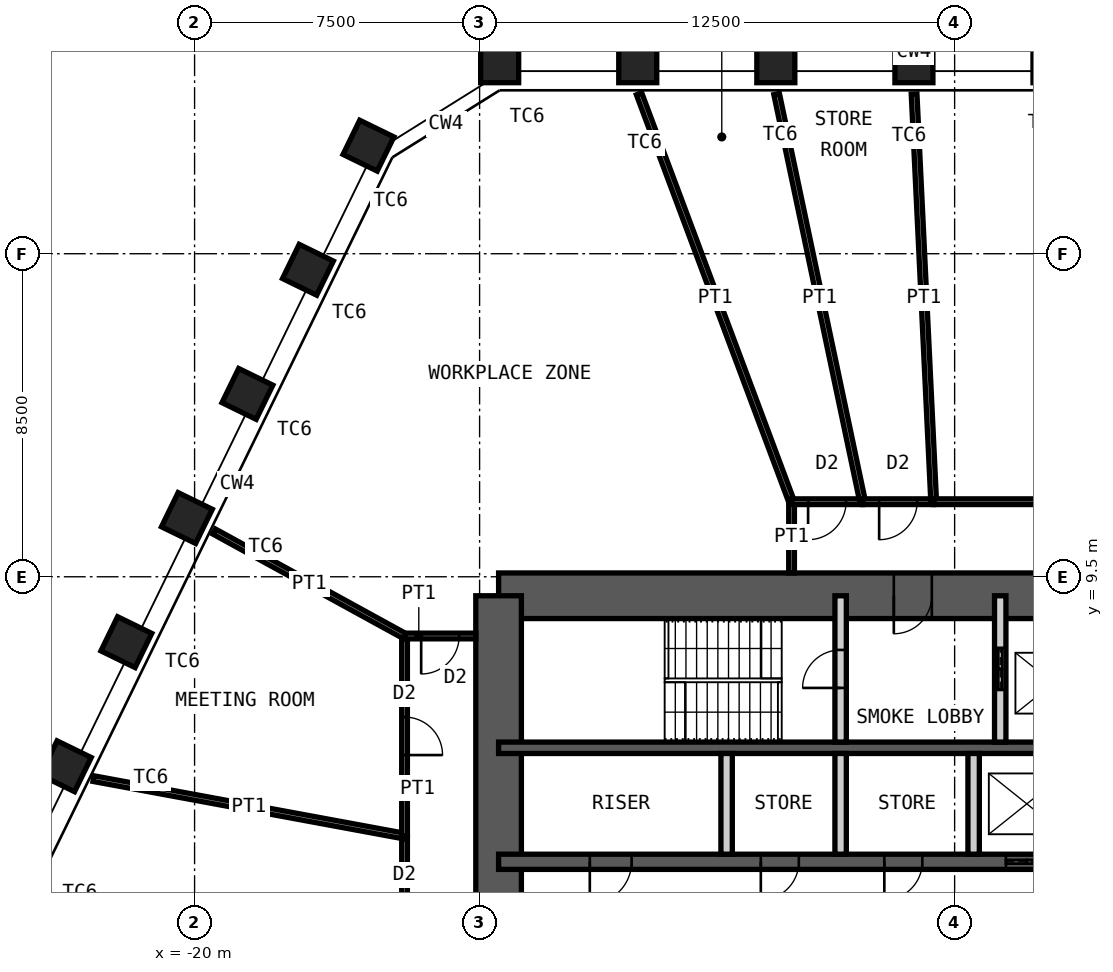
"""IFC4 building model, lengths in metres.
Left out: names, types, materials, properties, quantities, classifications, styles, units other than length and angle.
Written with IfcOpenShell. Run it as: python <this file> out.ifc"""

import sys

from ifc_helpers import new_model, si_unit, direction, frame, frame_2d, origin, origin_2d, place, context, subcontext, project, spatial, rectangle, hollow_rectangle, extrude, element, fill, save


model = new_model("IFC4")
c1 = context("Model", 3, precision=1e-05, world=origin(), true_north=direction((0.0, 1.0)))
c2 = subcontext(c1, "Body", "Model", "MODEL_VIEW")
j1 = project(units=[si_unit("LENGTHUNIT", "METRE"), si_unit("PLANEANGLEUNIT", "RADIAN")], contexts=[c1])
p1 = place(None, origin())
s1 = spatial("IfcSite", under=j1, at=p1, CompositionType="ELEMENT")
p2 = place(p1, origin())
s2 = spatial("IfcBuilding", under=s1, at=p2, CompositionType="ELEMENT")
p3 = place(p2, frame((0.0, 0.0, 239.2)))
s3 = spatial("IfcBuildingStorey", under=s2, at=p3, CompositionType="ELEMENT", Elevation=239.2)
for number, where, z_axis, x_axis in (
    (1, (-11.972, 23.0, 0.0), (0.0, 0.0, 1.0), (-1.0, 0.0, 0.0)),
    (2, (-8.338, 23.0, 0.0), (0.0, 0.0, 1.0), (-1.0, 0.0, 0.0)),
    (3, (-4.705, 23.0, 0.0), (0.0, 0.0, 1.0), (-1.0, 0.0, 0.0)),
    (4, (-1.071, 23.0, 0.0), (0.0, 0.0, 1.0), (-1.0, 0.0, 0.0)),
    (5, (-23.388, 4.514, 0.0), (0.0, 0.0, 1.0), (-0.438, -0.899, 0.0)),
    (6, (-21.795, 7.78, 0.0), (0.0, 0.0, 1.0), (-0.438, -0.899, 0.0)),
    (7, (-20.203, 11.045, 0.0), (0.0, 0.0, 1.0), (-0.438, -0.899, 0.0)),
    (8, (-18.61, 14.311, 0.0), (0.0, 0.0, 1.0), (-0.438, -0.899, 0.0)),
    (9, (-17.017, 17.577, 0.0), (0.0, 0.0, 1.0), (-0.438, -0.899, 0.0)),
    (10, (-15.424, 20.843, 0.0), (0.0, 0.0, 1.0), (-0.438, -0.899, 0.0)),
):
    element("IfcColumn", number, at=place(p3, frame(where, z_axis=z_axis, x_axis=x_axis)), inside=s3, PredefinedType="COLUMN", context=c2, shape_type="SweptSolid", body=[
        extrude(hollow_rectangle(XDim=1.0, YDim=1.0, WallThickness=0.06, at=origin_2d()), origin(), (0.0, 0.0, 1.0), 4.2),
    ])
p4 = place(p3, frame((-12.0, 9.0, 0.0), z_axis=(0.0, 0.0, 1.0), x_axis=(1.0, 0.0, 0.0)))
e11 = element("IfcWall", 11, at=p4, inside=s3, PredefinedType="SHEAR", context=c2, shape_type="SweptSolid", body=[
    extrude(rectangle(XDim=24.0, YDim=1.2, at=frame_2d((12.0, 0.0))), origin(), (0.0, 0.0, 1.0), 4.2),
])
p5 = place(p4, frame((10.4, 0.0, 0.0)))
e12 = element("IfcOpeningElement", 12, at=p5, cuts=e11, PredefinedType="OPENING", context=c2, shape_type="SweptSolid", body=[
    extrude(rectangle(XDim=1.0, YDim=2.1, at=frame_2d((0.5, 1.05))), frame((0.0, 0.61, 0.0), z_axis=(0.0, -1.0, 0.0), x_axis=(1.0, 0.0, 0.0)), (0.0, 0.0, 1.0), 1.22),
])
p6 = place(p4, frame((17.6, 0.0, 0.0)))
e13 = element("IfcOpeningElement", 13, at=p6, cuts=e11, PredefinedType="OPENING", context=c2, shape_type="SweptSolid", body=[
    extrude(rectangle(XDim=0.9, YDim=2.1, at=frame_2d((0.45, 1.05))), frame((0.0, 0.61, 0.0), z_axis=(0.0, -1.0, 0.0), x_axis=(1.0, 0.0, 0.0)), (0.0, 0.0, 1.0), 1.22),
])
p7 = place(p4, frame((21.9, 0.0, 0.0)))
e14 = element("IfcOpeningElement", 14, at=p7, cuts=e11, PredefinedType="OPENING", context=c2, shape_type="SweptSolid", body=[
    extrude(rectangle(XDim=0.9, YDim=2.1, at=frame_2d((0.45, 1.05))), frame((0.0, 0.61, 0.0), z_axis=(0.0, -1.0, 0.0), x_axis=(1.0, 0.0, 0.0)), (0.0, 0.0, 1.0), 1.22),
])
p8 = place(p3, frame((-12.0, -9.0, 0.0), z_axis=(0.0, 0.0, 1.0), x_axis=(0.0, 1.0, 0.0)))
e15 = element("IfcWall", 15, at=p8, inside=s3, PredefinedType="SHEAR", context=c2, shape_type="SweptSolid", body=[
    extrude(rectangle(XDim=18.0, YDim=1.2, at=frame_2d((9.0, 0.0))), origin(), (0.0, 0.0, 1.0), 4.2),
])
p9 = place(p8, frame((8.1, 0.0, 0.0)))
e16 = element("IfcOpeningElement", 16, at=p9, cuts=e15, PredefinedType="OPENING", context=c2, shape_type="SweptSolid", body=[
    extrude(rectangle(XDim=1.8, YDim=2.1, at=frame_2d((0.9, 1.05))), frame((0.0, 0.61, 0.0), z_axis=(0.0, -1.0, 0.0), x_axis=(1.0, 0.0, 0.0)), (0.0, 0.0, 1.0), 1.22),
])
p10 = place(p3, frame((-12.0, 5.0, 0.0), z_axis=(0.0, 0.0, 1.0), x_axis=(1.0, 0.0, 0.0)))
e17 = element("IfcWall", 17, at=p10, inside=s3, PredefinedType="SHEAR", context=c2, shape_type="SweptSolid", body=[
    extrude(rectangle(XDim=24.0, YDim=0.3, at=frame_2d((12.0, 0.0))), origin(), (0.0, 0.0, 1.0), 4.2),
])
p11 = place(p3, frame((-12.0, 2.0, 0.0), z_axis=(0.0, 0.0, 1.0), x_axis=(1.0, 0.0, 0.0)))
e18 = element("IfcWall", 18, at=p11, inside=s3, PredefinedType="SHEAR", context=c2, shape_type="SweptSolid", body=[
    extrude(rectangle(XDim=24.0, YDim=0.4, at=frame_2d((12.0, 0.0))), origin(), (0.0, 0.0, 1.0), 4.2),
])
p12 = place(p11, frame((2.4, 0.0, 0.0)))
e19 = element("IfcOpeningElement", 19, at=p12, cuts=e18, PredefinedType="OPENING", context=c2, shape_type="SweptSolid", body=[
    extrude(rectangle(XDim=1.1, YDim=2.1, at=frame_2d((0.55, 1.05))), frame((0.0, 0.21, 0.0), z_axis=(0.0, -1.0, 0.0), x_axis=(1.0, 0.0, 0.0)), (0.0, 0.0, 1.0), 0.42),
])
p13 = place(p11, frame((22.0, 0.0, 0.0)))
e20 = element("IfcOpeningElement", 20, at=p13, cuts=e18, PredefinedType="OPENING", context=c2, shape_type="SweptSolid", body=[
    extrude(rectangle(XDim=1.1, YDim=2.1, at=frame_2d((0.55, 1.05))), frame((0.0, 0.21, 0.0), z_axis=(0.0, -1.0, 0.0), x_axis=(1.0, 0.0, 0.0)), (0.0, 0.0, 1.0), 0.42),
])
p14 = place(p11, frame((10.15, 0.0, 0.0)))
e21 = element("IfcOpeningElement", 21, at=p14, cuts=e18, PredefinedType="OPENING", context=c2, shape_type="SweptSolid", body=[
    extrude(rectangle(XDim=1.0, YDim=2.1, at=frame_2d((0.5, 1.05))), frame((0.0, 0.21, 0.0), z_axis=(0.0, -1.0, 0.0), x_axis=(1.0, 0.0, 0.0)), (0.0, 0.0, 1.0), 0.42),
])
p15 = place(p11, frame((6.9, 0.0, 0.0)))
e22 = element("IfcOpeningElement", 22, at=p15, cuts=e18, PredefinedType="OPENING", context=c2, shape_type="SweptSolid", body=[
    extrude(rectangle(XDim=1.0, YDim=2.1, at=frame_2d((0.5, 1.05))), frame((0.0, 0.21, 0.0), z_axis=(0.0, -1.0, 0.0), x_axis=(1.0, 0.0, 0.0)), (0.0, 0.0, 1.0), 0.42),
])
p16 = place(p11, frame((13.35, 0.0, 0.0)))
e23 = element("IfcOpeningElement", 23, at=p16, cuts=e18, PredefinedType="OPENING", context=c2, shape_type="SweptSolid", body=[
    extrude(rectangle(XDim=1.1, YDim=2.4, at=frame_2d((0.55, 1.2))), frame((0.0, 0.21, 0.0), z_axis=(0.0, -1.0, 0.0), x_axis=(1.0, 0.0, 0.0)), (0.0, 0.0, 1.0), 0.42),
])
p17 = place(p11, frame((16.15, 0.0, 0.0)))
e24 = element("IfcOpeningElement", 24, at=p17, cuts=e18, PredefinedType="OPENING", context=c2, shape_type="SweptSolid", body=[
    extrude(rectangle(XDim=1.1, YDim=2.4, at=frame_2d((0.55, 1.2))), frame((0.0, 0.21, 0.0), z_axis=(0.0, -1.0, 0.0), x_axis=(1.0, 0.0, 0.0)), (0.0, 0.0, 1.0), 0.42),
])
p18 = place(p11, frame((18.95, 0.0, 0.0)))
e25 = element("IfcOpeningElement", 25, at=p18, cuts=e18, PredefinedType="OPENING", context=c2, shape_type="SweptSolid", body=[
    extrude(rectangle(XDim=1.1, YDim=2.4, at=frame_2d((0.55, 1.2))), frame((0.0, 0.21, 0.0), z_axis=(0.0, -1.0, 0.0), x_axis=(1.0, 0.0, 0.0)), (0.0, 0.0, 1.0), 0.42),
])
p19 = place(p3, frame((-3.0, 5.15, 0.0), z_axis=(0.0, 0.0, 1.0), x_axis=(0.0, 1.0, 0.0)))
e26 = element("IfcWall", 26, at=p19, inside=s3, PredefinedType="PARTITIONING", context=c2, shape_type="SweptSolid", body=[
    extrude(rectangle(XDim=3.85, YDim=0.3, at=frame_2d((1.925, 0.0))), origin(), (0.0, 0.0, 1.0), 3.98),
])
p20 = place(p19, frame((1.425, 0.0, 0.0)))
e27 = element("IfcOpeningElement", 27, at=p20, cuts=e26, PredefinedType="OPENING", context=c2, shape_type="SweptSolid", body=[
    extrude(rectangle(XDim=1.0, YDim=2.1, at=frame_2d((0.5, 1.05))), frame((0.0, 0.16, 0.0), z_axis=(0.0, -1.0, 0.0), x_axis=(1.0, 0.0, 0.0)), (0.0, 0.0, 1.0), 0.32),
])
p21 = place(p3, frame((1.2, 5.15, 0.0), z_axis=(0.0, 0.0, 1.0), x_axis=(0.0, 1.0, 0.0)))
e28 = element("IfcWall", 28, at=p21, inside=s3, PredefinedType="PARTITIONING", context=c2, shape_type="SweptSolid", body=[
    extrude(rectangle(XDim=3.85, YDim=0.3, at=frame_2d((1.925, 0.0))), origin(), (0.0, 0.0, 1.0), 3.98),
])
p22 = place(p21, frame((1.375, 0.0, 0.0)))
e29 = element("IfcOpeningElement", 29, at=p22, cuts=e28, PredefinedType="OPENING", context=c2, shape_type="SweptSolid", body=[
    extrude(rectangle(XDim=1.1, YDim=2.4, at=frame_2d((0.55, 1.2))), frame((0.0, 0.16, 0.0), z_axis=(0.0, -1.0, 0.0), x_axis=(1.0, 0.0, 0.0)), (0.0, 0.0, 1.0), 0.32),
])
for number, where, z_axis, x_axis in (
    (30, (-6.0, 2.2, 0.0), (0.0, 0.0, 1.0), (0.0, 1.0, 0.0)),
    (31, (-3.0, 2.2, 0.0), (0.0, 0.0, 1.0), (0.0, 1.0, 0.0)),
    (32, (0.5, 2.2, 0.0), (0.0, 0.0, 1.0), (0.0, 1.0, 0.0)),
):
    element("IfcWall", number, at=place(p3, frame(where, z_axis=z_axis, x_axis=x_axis)), inside=s3, PredefinedType="PARTITIONING", context=c2, shape_type="SweptSolid", body=[
        extrude(rectangle(XDim=2.65, YDim=0.3, at=frame_2d((1.325, 0.0))), origin(), (0.0, 0.0, 1.0), 3.98),
    ])
p23 = place(p3, frame((-14.475, -1.576, 0.0), z_axis=(0.0, 0.0, 1.0), x_axis=(0.0, 1.0, 0.0)))
e33 = element("IfcWall", 33, at=p23, inside=s3, PredefinedType="PARTITIONING", context=c2, shape_type="SweptSolid", body=[
    extrude(rectangle(XDim=4.252, YDim=0.15, at=frame_2d((2.126, 0.0))), origin(), (0.0, 0.0, 1.0), 4.03),
])
p24 = place(p23, frame((1.626, 0.0, 0.0)))
e34 = element("IfcOpeningElement", 34, at=p24, cuts=e33, PredefinedType="OPENING", context=c2, shape_type="SweptSolid", body=[
    extrude(rectangle(XDim=1.0, YDim=2.4, at=frame_2d((0.5, 1.2))), frame((0.0, 0.085, 0.0), z_axis=(0.0, -1.0, 0.0), x_axis=(1.0, 0.0, 0.0)), (0.0, 0.0, 1.0), 0.17),
])
p25 = place(p3, frame((-22.661, 4.189, 0.0), z_axis=(0.0, 0.0, 1.0), x_axis=(0.983345347199, -0.181746879316, 0.0)))
e35 = element("IfcWall", 35, at=p25, inside=s3, PredefinedType="PARTITIONING", context=c2, shape_type="SweptSolid", body=[
    extrude(rectangle(XDim=8.324, YDim=0.15, at=frame_2d((4.162, 0.0))), origin(), (0.0, 0.0, 1.0), 3.43),
])
p26 = place(p3, frame((-14.475, 2.676, 0.0), z_axis=(0.0, 0.0, 1.0), x_axis=(0.0, 1.0, 0.0)))
e36 = element("IfcWall", 36, at=p26, inside=s3, PredefinedType="PARTITIONING", context=c2, shape_type="SweptSolid", body=[
    extrude(rectangle(XDim=5.266, YDim=0.15, at=frame_2d((2.633, 0.0))), origin(), (0.0, 0.0, 1.0), 4.03),
])
p27 = place(p26, frame((2.133, 0.0, 0.0)))
e37 = element("IfcOpeningElement", 37, at=p27, cuts=e36, PredefinedType="OPENING", context=c2, shape_type="SweptSolid", body=[
    extrude(rectangle(XDim=1.0, YDim=2.4, at=frame_2d((0.5, 1.2))), frame((0.0, 0.085, 0.0), z_axis=(0.0, -1.0, 0.0), x_axis=(1.0, 0.0, 0.0)), (0.0, 0.0, 1.0), 0.17),
])
p28 = place(p3, frame((-19.486, 10.69, 0.0), z_axis=(0.0, 0.0, 1.0), x_axis=(0.876724089264, -0.480993629172, 0.0)))
e38 = element("IfcWall", 38, at=p28, inside=s3, PredefinedType="PARTITIONING", context=c2, shape_type="SweptSolid", body=[
    extrude(rectangle(XDim=5.715, YDim=0.15, at=frame_2d((2.858, 0.0))), origin(), (0.0, 0.0, 1.0), 3.43),
])
p29 = place(p3, frame((-14.475, 7.941, 0.0), z_axis=(0.0, 0.0, 1.0), x_axis=(1.0, 0.0, 0.0)))
e39 = element("IfcWall", 39, at=p29, inside=s3, PredefinedType="PARTITIONING", context=c2, shape_type="SweptSolid", body=[
    extrude(rectangle(XDim=1.875, YDim=0.15, at=frame_2d((0.938, 0.0))), origin(), (0.0, 0.0, 1.0), 4.03),
])
p30 = place(p29, frame((0.438, 0.0, 0.0)))
e40 = element("IfcOpeningElement", 40, at=p30, cuts=e39, PredefinedType="OPENING", context=c2, shape_type="SweptSolid", body=[
    extrude(rectangle(XDim=1.0, YDim=2.4, at=frame_2d((0.5, 1.2))), frame((0.0, 0.085, 0.0), z_axis=(0.0, -1.0, 0.0), x_axis=(1.0, 0.0, 0.0)), (0.0, 0.0, 1.0), 0.17),
])
p31 = place(p3, frame((-4.291, 9.6, 0.0), z_axis=(0.0, 0.0, 1.0), x_axis=(0.0, 1.0, 0.0)))
e41 = element("IfcWall", 41, at=p31, inside=s3, PredefinedType="PARTITIONING", context=c2, shape_type="SweptSolid", body=[
    extrude(rectangle(XDim=1.875, YDim=0.15, at=frame_2d((0.938, 0.0))), origin(), (0.0, 0.0, 1.0), 4.03),
])
p32 = place(p3, frame((-8.303, 22.206, 0.0), z_axis=(0.0, 0.0, 1.0), x_axis=(0.350242883069, -0.936658914899, 0.0)))
e42 = element("IfcWall", 42, at=p32, inside=s3, PredefinedType="PARTITIONING", context=c2, shape_type="SweptSolid", body=[
    extrude(rectangle(XDim=11.457, YDim=0.15, at=frame_2d((5.729, 0.0))), origin(), (0.0, 0.0, 1.0), 3.43),
])
p33 = place(p3, frame((-4.291, 11.475, 0.0), z_axis=(0.0, 0.0, 1.0), x_axis=(1.0, 0.0, 0.0)))
e43 = element("IfcWall", 43, at=p33, inside=s3, PredefinedType="PARTITIONING", context=c2, shape_type="SweptSolid", body=[
    extrude(rectangle(XDim=1.87, YDim=0.15, at=frame_2d((0.935, 0.0))), origin(), (0.0, 0.0, 1.0), 4.03),
])
p34 = place(p33, frame((0.435, 0.0, 0.0)))
e44 = element("IfcOpeningElement", 44, at=p34, cuts=e43, PredefinedType="OPENING", context=c2, shape_type="SweptSolid", body=[
    extrude(rectangle(XDim=1.0, YDim=2.4, at=frame_2d((0.5, 1.2))), frame((0.0, 0.085, 0.0), z_axis=(0.0, -1.0, 0.0), x_axis=(1.0, 0.0, 0.0)), (0.0, 0.0, 1.0), 0.17),
])
p35 = place(p3, frame((-4.684, 22.202, 0.0), z_axis=(0.0, 0.0, 1.0), x_axis=(0.206456017157, -0.978455881979, 0.0)))
e45 = element("IfcWall", 45, at=p35, inside=s3, PredefinedType="PARTITIONING", context=c2, shape_type="SweptSolid", body=[
    extrude(rectangle(XDim=10.963, YDim=0.15, at=frame_2d((5.481, 0.0))), origin(), (0.0, 0.0, 1.0), 3.43),
])
p36 = place(p3, frame((-2.421, 11.475, 0.0), z_axis=(0.0, 0.0, 1.0), x_axis=(1.0, 0.0, 0.0)))
e46 = element("IfcWall", 46, at=p36, inside=s3, PredefinedType="PARTITIONING", context=c2, shape_type="SweptSolid", body=[
    extrude(rectangle(XDim=1.87, YDim=0.15, at=frame_2d((0.935, 0.0))), origin(), (0.0, 0.0, 1.0), 4.03),
])
p37 = place(p36, frame((0.435, 0.0, 0.0)))
e47 = element("IfcOpeningElement", 47, at=p37, cuts=e46, PredefinedType="OPENING", context=c2, shape_type="SweptSolid", body=[
    extrude(rectangle(XDim=1.0, YDim=2.4, at=frame_2d((0.5, 1.2))), frame((0.0, 0.085, 0.0), z_axis=(0.0, -1.0, 0.0), x_axis=(1.0, 0.0, 0.0)), (0.0, 0.0, 1.0), 0.17),
])
p38 = place(p3, frame((-1.067, 22.2, 0.0), z_axis=(0.0, 0.0, 1.0), x_axis=(0.047998335863, -0.998847415652, 0.0)))
e48 = element("IfcWall", 48, at=p38, inside=s3, PredefinedType="PARTITIONING", context=c2, shape_type="SweptSolid", body=[
    extrude(rectangle(XDim=10.738, YDim=0.15, at=frame_2d((5.369, 0.0))), origin(), (0.0, 0.0, 1.0), 3.43),
])
p39 = place(p3, frame((-0.551, 11.475, 0.0), z_axis=(0.0, 0.0, 1.0), x_axis=(1.0, 0.0, 0.0)))
e49 = element("IfcWall", 49, at=p39, inside=s3, PredefinedType="PARTITIONING", context=c2, shape_type="SweptSolid", body=[
    extrude(rectangle(XDim=10.342, YDim=0.15, at=frame_2d((5.171, 0.0))), origin(), (0.0, 0.0, 1.0), 4.03),
])
p40 = place(p39, frame((4.271, 0.0, 0.0)))
e50 = element("IfcOpeningElement", 50, at=p40, cuts=e49, PredefinedType="OPENING", context=c2, shape_type="SweptSolid", body=[
    extrude(rectangle(XDim=1.8, YDim=2.4, at=frame_2d((0.9, 1.2))), frame((0.0, 0.085, 0.0), z_axis=(0.0, -1.0, 0.0), x_axis=(1.0, 0.0, 0.0)), (0.0, 0.0, 1.0), 0.17),
])
p41 = place(p5, origin())
e51 = element("IfcDoor", 51, at=p41, inside=s3, OperationType="SINGLE_SWING_LEFT", PredefinedType="DOOR", context=c2, shape_type="SweptSolid", body=[
    extrude(rectangle(XDim=1.0, YDim=2.1, at=frame_2d((0.5, 1.05))), frame((0.0, 0.025, 0.0), z_axis=(0.0, -1.0, 0.0), x_axis=(1.0, 0.0, 0.0)), (0.0, 0.0, 1.0), 0.05),
])
fill(e12, e51)
p42 = place(p20, origin())
e52 = element("IfcDoor", 52, at=p42, inside=s3, OperationType="SINGLE_SWING_RIGHT", PredefinedType="DOOR", context=c2, shape_type="SweptSolid", body=[
    extrude(rectangle(XDim=1.0, YDim=2.1, at=frame_2d((0.5, 1.05))), frame((0.0, 0.025, 0.0), z_axis=(0.0, -1.0, 0.0), x_axis=(1.0, 0.0, 0.0)), (0.0, 0.0, 1.0), 0.05),
])
fill(e27, e52)
p43 = place(p12, origin())
e53 = element("IfcDoor", 53, at=p43, inside=s3, OperationType="SINGLE_SWING_LEFT", PredefinedType="DOOR", context=c2, shape_type="SweptSolid", body=[
    extrude(rectangle(XDim=1.1, YDim=2.1, at=frame_2d((0.55, 1.05))), frame((0.0, 0.025, 0.0), z_axis=(0.0, -1.0, 0.0), x_axis=(1.0, 0.0, 0.0)), (0.0, 0.0, 1.0), 0.05),
])
fill(e19, e53)
p44 = place(p14, origin())
e54 = element("IfcDoor", 54, at=p44, inside=s3, OperationType="SINGLE_SWING_LEFT", PredefinedType="DOOR", context=c2, shape_type="SweptSolid", body=[
    extrude(rectangle(XDim=1.0, YDim=2.1, at=frame_2d((0.5, 1.05))), frame((0.0, 0.025, 0.0), z_axis=(0.0, -1.0, 0.0), x_axis=(1.0, 0.0, 0.0)), (0.0, 0.0, 1.0), 0.05),
])
fill(e21, e54)
p45 = place(p22, origin())
e55 = element("IfcDoor", 55, at=p45, inside=s3, OperationType="DOUBLE_DOOR_SLIDING", PredefinedType="DOOR", context=c2, shape_type="SweptSolid", body=[
    extrude(rectangle(XDim=1.1, YDim=2.4, at=frame_2d((0.55, 1.2))), frame((0.0, 0.025, 0.0), z_axis=(0.0, -1.0, 0.0), x_axis=(1.0, 0.0, 0.0)), (0.0, 0.0, 1.0), 0.05),
])
fill(e29, e55)
p46 = place(p15, origin())
e56 = element("IfcDoor", 56, at=p46, inside=s3, OperationType="SINGLE_SWING_LEFT", PredefinedType="DOOR", context=c2, shape_type="SweptSolid", body=[
    extrude(rectangle(XDim=1.0, YDim=2.1, at=frame_2d((0.5, 1.05))), frame((0.0, 0.025, 0.0), z_axis=(0.0, -1.0, 0.0), x_axis=(1.0, 0.0, 0.0)), (0.0, 0.0, 1.0), 0.05),
])
fill(e22, e56)
p47 = place(p16, origin())
e57 = element("IfcDoor", 57, at=p47, inside=s3, OperationType="DOUBLE_DOOR_SLIDING", PredefinedType="DOOR", context=c2, shape_type="SweptSolid", body=[
    extrude(rectangle(XDim=1.1, YDim=2.4, at=frame_2d((0.55, 1.2))), frame((0.0, 0.025, 0.0), z_axis=(0.0, -1.0, 0.0), x_axis=(1.0, 0.0, 0.0)), (0.0, 0.0, 1.0), 0.05),
])
fill(e23, e57)
p48 = place(p27, origin())
e58 = element("IfcDoor", 58, at=p48, inside=s3, OperationType="SINGLE_SWING_LEFT", PredefinedType="DOOR", context=c2, shape_type="SweptSolid", body=[
    extrude(rectangle(XDim=1.0, YDim=2.4, at=frame_2d((0.5, 1.2))), frame((0.0, 0.025, 0.0), z_axis=(0.0, -1.0, 0.0), x_axis=(1.0, 0.0, 0.0)), (0.0, 0.0, 1.0), 0.05),
])
fill(e37, e58)
p49 = place(p30, origin())
e59 = element("IfcDoor", 59, at=p49, inside=s3, OperationType="SINGLE_SWING_LEFT", PredefinedType="DOOR", context=c2, shape_type="SweptSolid", body=[
    extrude(rectangle(XDim=1.0, YDim=2.4, at=frame_2d((0.5, 1.2))), frame((0.0, 0.025, 0.0), z_axis=(0.0, -1.0, 0.0), x_axis=(1.0, 0.0, 0.0)), (0.0, 0.0, 1.0), 0.05),
])
fill(e40, e59)
p50 = place(p34, origin())
e60 = element("IfcDoor", 60, at=p50, inside=s3, OperationType="SINGLE_SWING_LEFT", PredefinedType="DOOR", context=c2, shape_type="SweptSolid", body=[
    extrude(rectangle(XDim=1.0, YDim=2.4, at=frame_2d((0.5, 1.2))), frame((0.0, 0.025, 0.0), z_axis=(0.0, -1.0, 0.0), x_axis=(1.0, 0.0, 0.0)), (0.0, 0.0, 1.0), 0.05),
])
fill(e44, e60)
p51 = place(p37, origin())
e61 = element("IfcDoor", 61, at=p51, inside=s3, OperationType="SINGLE_SWING_LEFT", PredefinedType="DOOR", context=c2, shape_type="SweptSolid", body=[
    extrude(rectangle(XDim=1.0, YDim=2.4, at=frame_2d((0.5, 1.2))), frame((0.0, 0.025, 0.0), z_axis=(0.0, -1.0, 0.0), x_axis=(1.0, 0.0, 0.0)), (0.0, 0.0, 1.0), 0.05),
])
fill(e47, e61)
save(model, sys.argv[1])
